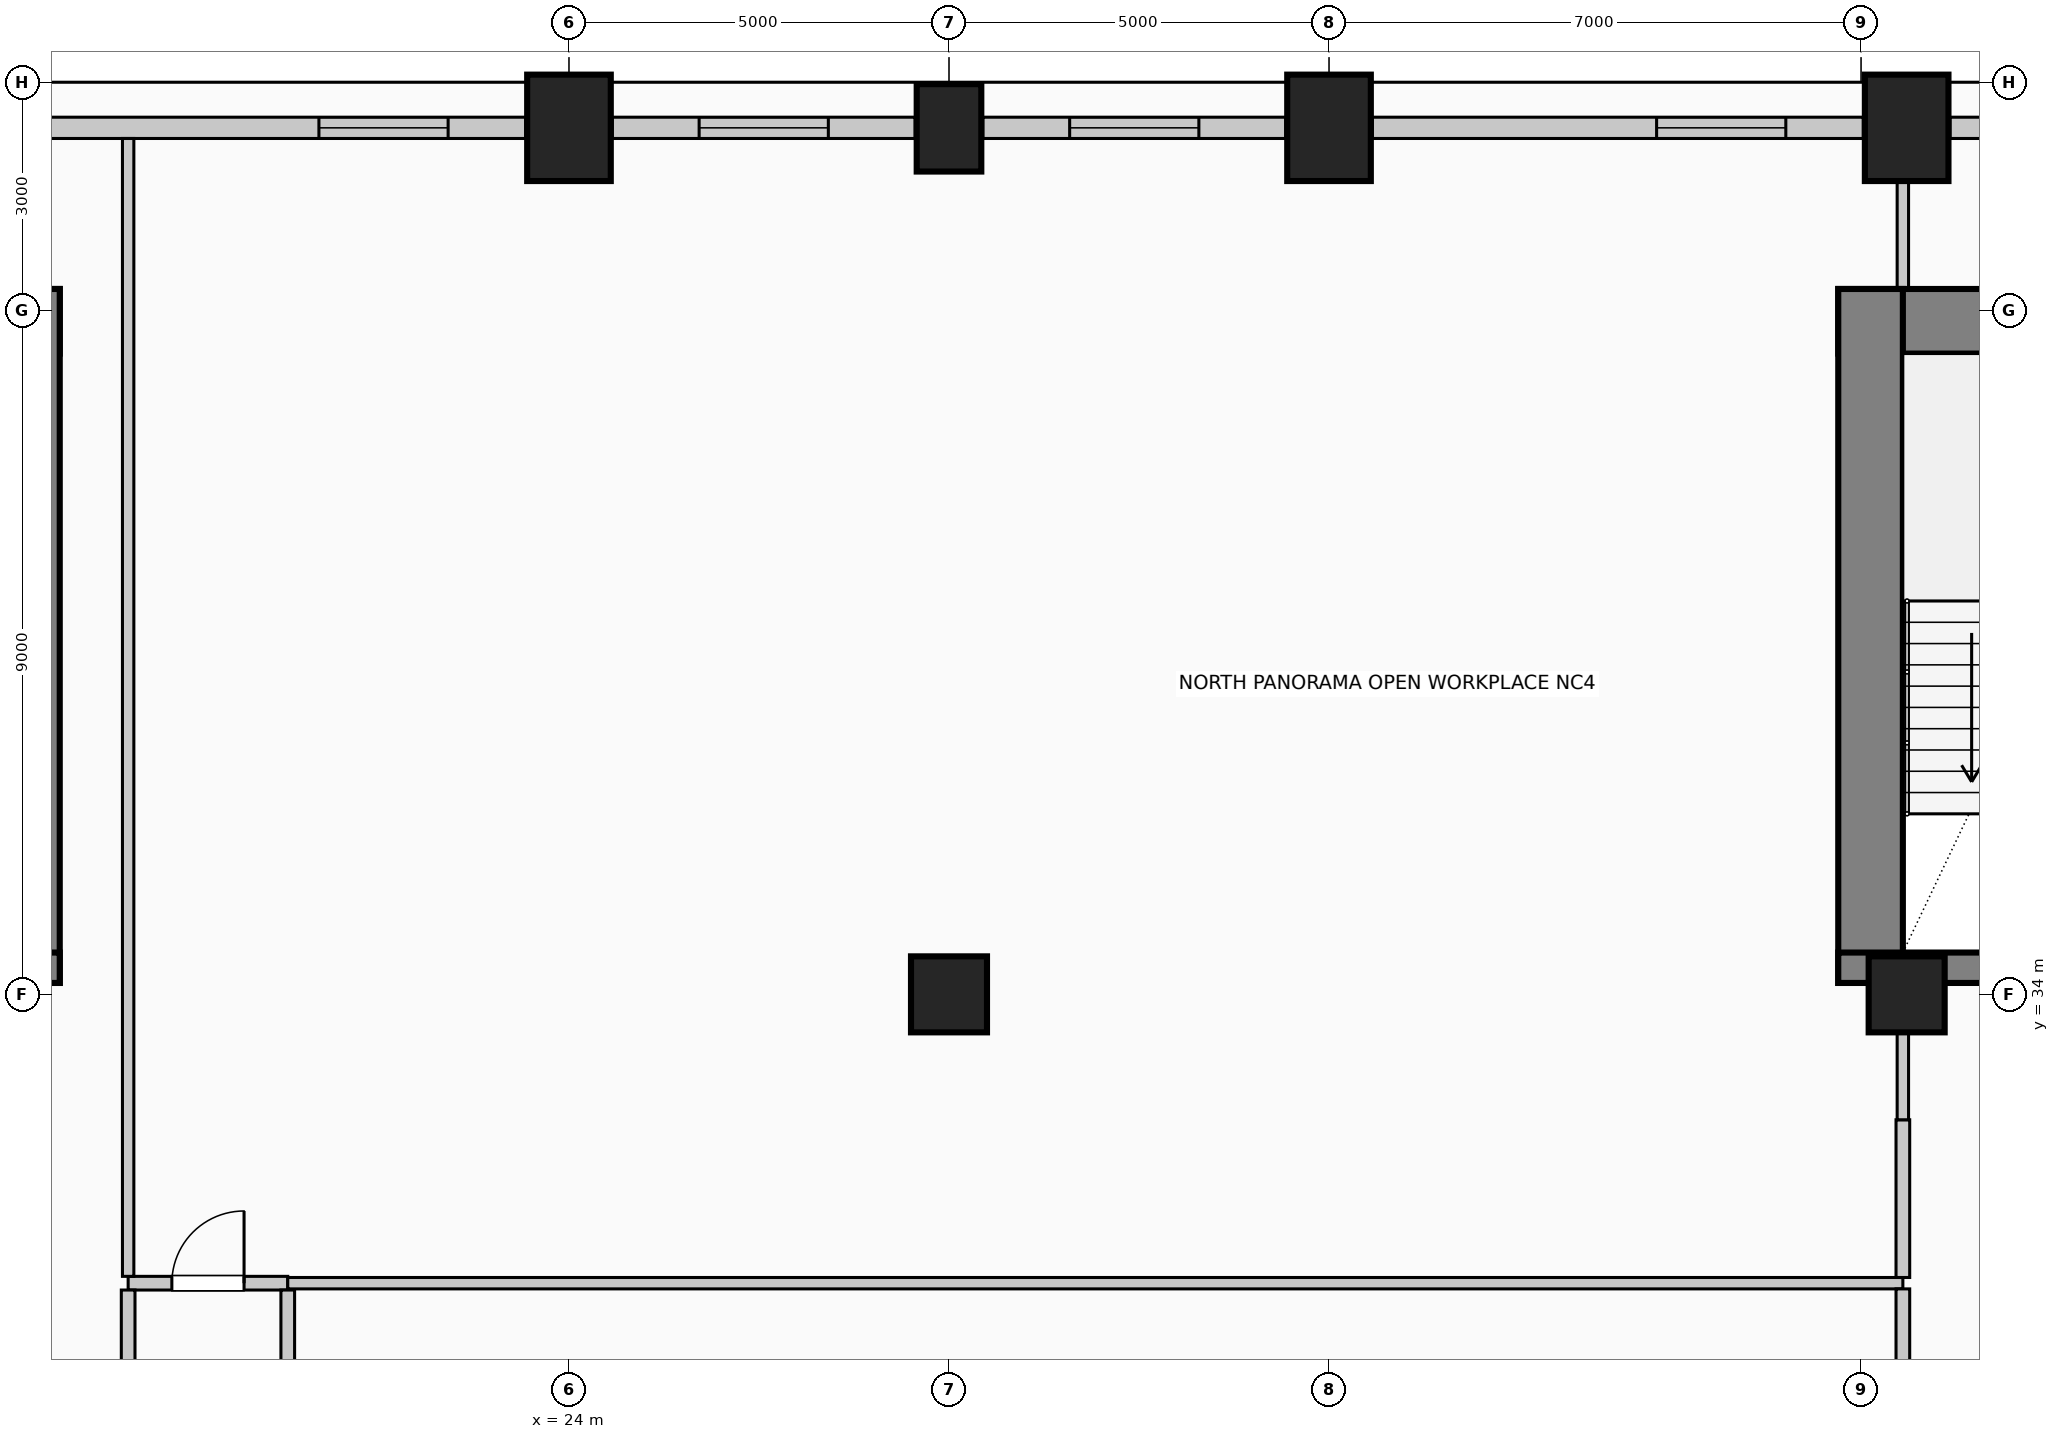
"""IFC4 building model, lengths in metres.
Left out: names, types, materials, properties, quantities, classifications, styles, units other than length and angle.
Written with IfcOpenShell. Run it as: python <this file> out.ifc"""

import sys

from ifc_helpers import new_model, si_unit, direction, frame, frame_2d, origin, origin_2d, place, context, subcontext, project, spatial, rectangle, circle, extrude, element, fill, save


model = new_model("IFC4")
c1 = context("Model", 3, precision=1e-05, world=origin(), true_north=direction((0.0, 1.0)))
c2 = subcontext(c1, "Body", "Model", "MODEL_VIEW")
j1 = project(units=[si_unit("LENGTHUNIT", "METRE"), si_unit("PLANEANGLEUNIT", "RADIAN")], contexts=[c1])
p1 = place(None, origin())
s1 = spatial("IfcSite", under=j1, at=p1, CompositionType="ELEMENT")
p2 = place(p1, origin())
s2 = spatial("IfcBuilding", under=s1, at=p2, CompositionType="ELEMENT")
p3 = place(p2, frame((0.0, 0.0, 96.6)))
s3 = spatial("IfcBuildingStorey", under=s2, at=p3, CompositionType="ELEMENT", Elevation=96.6)
p4 = place(p3, frame((2.7, 42.855, 0.0), z_axis=(0.0, 0.0, 1.0), x_axis=(1.0, 0.0, 0.0)))
e1 = element("IfcWall", 1, at=p4, inside=s3, PredefinedType="SHEAR", context=c2, shape_type="SweptSolid", body=[
    extrude(rectangle(XDim=14.6, YDim=0.85, at=frame_2d((7.3, 0.0))), origin(), (0.0, 0.0, 1.0), 4.0),
])
p5 = place(p3, frame((16.875, 34.15, 0.0), z_axis=(0.0, 0.0, 1.0), x_axis=(0.0, 1.0, 0.0)))
e2 = element("IfcWall", 2, at=p5, inside=s3, PredefinedType="SHEAR", context=c2, shape_type="SweptSolid", body=[
    extrude(rectangle(XDim=9.13, YDim=0.85, at=frame_2d((4.565, 0.0))), origin(), (0.0, 0.0, 1.0), 4.0),
])
p6 = place(p3, frame((12.29, 34.35, 0.0), z_axis=(0.0, 0.0, 1.0), x_axis=(1.0, 0.0, 0.0)))
e3 = element("IfcWall", 3, at=p6, inside=s3, PredefinedType="SHEAR", context=c2, shape_type="SweptSolid", body=[
    extrude(rectangle(XDim=5.01, YDim=0.4, at=frame_2d((2.505, 0.0))), origin(), (0.0, 0.0, 1.0), 4.0),
])
p7 = place(p6, frame((1.4, 0.0, 0.0)))
e4 = element("IfcOpeningElement", 4, at=p7, cuts=e3, PredefinedType="OPENING", context=c2, shape_type="SweptSolid", body=[
    extrude(rectangle(XDim=1.15, YDim=2.2, at=frame_2d((0.575, 1.1))), frame((0.0, 0.21, 0.0), z_axis=(0.0, -1.0, 0.0), x_axis=(1.0, 0.0, 0.0)), (0.0, 0.0, 1.0), 0.42),
])
p8 = place(p3, frame((40.7, 42.855, 0.0), z_axis=(0.0, 0.0, 1.0), x_axis=(1.0, 0.0, 0.0)))
e5 = element("IfcWall", 5, at=p8, inside=s3, PredefinedType="SHEAR", context=c2, shape_type="SweptSolid", body=[
    extrude(rectangle(XDim=14.6, YDim=0.85, at=frame_2d((7.3, 0.0))), origin(), (0.0, 0.0, 1.0), 4.0),
])
p9 = place(p3, frame((41.125, 34.15, 0.0), z_axis=(0.0, 0.0, 1.0), x_axis=(0.0, 1.0, 0.0)))
e6 = element("IfcWall", 6, at=p9, inside=s3, PredefinedType="SHEAR", context=c2, shape_type="SweptSolid", body=[
    extrude(rectangle(XDim=9.13, YDim=0.85, at=frame_2d((4.565, 0.0))), origin(), (0.0, 0.0, 1.0), 4.0),
])
p10 = place(p3, frame((40.7, 34.35, 0.0), z_axis=(0.0, 0.0, 1.0), x_axis=(1.0, 0.0, 0.0)))
e7 = element("IfcWall", 7, at=p10, inside=s3, PredefinedType="SHEAR", context=c2, shape_type="SweptSolid", body=[
    extrude(rectangle(XDim=5.01, YDim=0.4, at=frame_2d((2.505, 0.0))), origin(), (0.0, 0.0, 1.0), 4.0),
])
p11 = place(p10, frame((2.4, 0.0, 0.0)))
e8 = element("IfcOpeningElement", 8, at=p11, cuts=e7, PredefinedType="OPENING", context=c2, shape_type="SweptSolid", body=[
    extrude(rectangle(XDim=1.15, YDim=2.2, at=frame_2d((0.575, 1.1))), frame((0.0, 0.21, 0.0), z_axis=(0.0, -1.0, 0.0), x_axis=(1.0, 0.0, 0.0)), (0.0, 0.0, 1.0), 0.42),
])
p12 = place(p3, frame((24.0, 45.4, 0.0), z_axis=(0.0, 0.0, 1.0), x_axis=(1.0, 0.0, 0.0)))
e9 = element("IfcColumn", 9, at=p12, inside=s3, PredefinedType="COLUMN", context=c2, shape_type="SweptSolid", body=[
    extrude(rectangle(XDim=1.1, YDim=1.4, at=origin_2d()), origin(), (0.0, 0.0, 1.0), 4.0),
])
p13 = place(p3, frame((29.0, 45.4, 0.0), z_axis=(0.0, 0.0, 1.0), x_axis=(1.0, 0.0, 0.0)))
e10 = element("IfcColumn", 10, at=p13, inside=s3, PredefinedType="COLUMN", context=c2, shape_type="SweptSolid", body=[
    extrude(rectangle(XDim=0.85, YDim=1.15, at=origin_2d()), origin(), (0.0, 0.0, 1.0), 4.0),
])
for number, where, z_axis, x_axis in (
    (11, (34.0, 45.4, 0.0), (0.0, 0.0, 1.0), (1.0, 0.0, 0.0)),
    (12, (41.6, 45.4, 0.0), (0.0, 0.0, 1.0), (1.0, 0.0, 0.0)),
):
    element("IfcColumn", number, at=place(p3, frame(where, z_axis=z_axis, x_axis=x_axis)), inside=s3, PredefinedType="COLUMN", context=c2, shape_type="SweptSolid", body=[
        extrude(rectangle(XDim=1.1, YDim=1.4, at=origin_2d()), origin(), (0.0, 0.0, 1.0), 4.0),
    ])
for number, where, z_axis, x_axis in (
    (13, (29.0, 34.0, 0.0), (0.0, 0.0, 1.0), (1.0, 0.0, 0.0)),
    (14, (41.6, 34.0, 0.0), (0.0, 0.0, 1.0), (1.0, 0.0, 0.0)),
):
    element("IfcColumn", number, at=place(p3, frame(where, z_axis=z_axis, x_axis=x_axis)), inside=s3, PredefinedType="COLUMN", context=c2, shape_type="SweptSolid", body=[
        extrude(circle(Radius=0.5, at=origin_2d()), origin(), (0.0, 0.0, 1.0), 4.0),
    ])
p14 = place(p3, frame((16.97, 45.4, 0.0), z_axis=(0.0, 0.0, 1.0), x_axis=(1.0, 0.0, 0.0)))
e15 = element("IfcWall", 15, at=p14, inside=s3, PredefinedType="SOLIDWALL", context=c2, shape_type="SweptSolid", body=[
    extrude(rectangle(XDim=6.46, YDim=0.28, at=frame_2d((3.23, 0.0))), origin(), (0.0, 0.0, 1.0), 2.875),
])
p15 = place(p14, frame((3.74, 0.0, 0.5)))
e16 = element("IfcOpeningElement", 16, at=p15, cuts=e15, PredefinedType="OPENING", context=c2, shape_type="SweptSolid", body=[
    extrude(rectangle(XDim=1.7, YDim=1.95, at=frame_2d((0.85, 0.975))), frame((0.0, 0.15, 0.0), z_axis=(0.0, -1.0, 0.0), x_axis=(1.0, 0.0, 0.0)), (0.0, 0.0, 1.0), 0.3),
])
p16 = place(p3, frame((24.57, 45.4, 0.0), z_axis=(0.0, 0.0, 1.0), x_axis=(1.0, 0.0, 0.0)))
e17 = element("IfcWall", 17, at=p16, inside=s3, PredefinedType="SOLIDWALL", context=c2, shape_type="SweptSolid", body=[
    extrude(rectangle(XDim=3.985, YDim=0.28, at=frame_2d((1.992, 0.0))), origin(), (0.0, 0.0, 1.0), 2.875),
])
p17 = place(p16, frame((1.143, 0.0, 0.5)))
e18 = element("IfcOpeningElement", 18, at=p17, cuts=e17, PredefinedType="OPENING", context=c2, shape_type="SweptSolid", body=[
    extrude(rectangle(XDim=1.7, YDim=1.95, at=frame_2d((0.85, 0.975))), frame((0.0, 0.15, 0.0), z_axis=(0.0, -1.0, 0.0), x_axis=(1.0, 0.0, 0.0)), (0.0, 0.0, 1.0), 0.3),
])
p18 = place(p3, frame((29.445, 45.4, 0.0), z_axis=(0.0, 0.0, 1.0), x_axis=(1.0, 0.0, 0.0)))
e19 = element("IfcWall", 19, at=p18, inside=s3, PredefinedType="SOLIDWALL", context=c2, shape_type="SweptSolid", body=[
    extrude(rectangle(XDim=3.985, YDim=0.28, at=frame_2d((1.992, 0.0))), origin(), (0.0, 0.0, 1.0), 2.875),
])
p19 = place(p18, frame((1.143, 0.0, 0.5)))
e20 = element("IfcOpeningElement", 20, at=p19, cuts=e19, PredefinedType="OPENING", context=c2, shape_type="SweptSolid", body=[
    extrude(rectangle(XDim=1.7, YDim=1.95, at=frame_2d((0.85, 0.975))), frame((0.0, 0.15, 0.0), z_axis=(0.0, -1.0, 0.0), x_axis=(1.0, 0.0, 0.0)), (0.0, 0.0, 1.0), 0.3),
])
p20 = place(p3, frame((34.57, 45.4, 0.0), z_axis=(0.0, 0.0, 1.0), x_axis=(1.0, 0.0, 0.0)))
e21 = element("IfcWall", 21, at=p20, inside=s3, PredefinedType="SOLIDWALL", context=c2, shape_type="SweptSolid", body=[
    extrude(rectangle(XDim=6.46, YDim=0.28, at=frame_2d((3.23, 0.0))), origin(), (0.0, 0.0, 1.0), 2.875),
])
p21 = place(p20, frame((3.74, 0.0, 0.5)))
e22 = element("IfcOpeningElement", 22, at=p21, cuts=e21, PredefinedType="OPENING", context=c2, shape_type="SweptSolid", body=[
    extrude(rectangle(XDim=1.7, YDim=1.95, at=frame_2d((0.85, 0.975))), frame((0.0, 0.15, 0.0), z_axis=(0.0, -1.0, 0.0), x_axis=(1.0, 0.0, 0.0)), (0.0, 0.0, 1.0), 0.3),
])
p22 = place(p3, frame((42.17, 45.4, 0.0), z_axis=(0.0, 0.0, 1.0), x_axis=(1.0, 0.0, 0.0)))
e23 = element("IfcWall", 23, at=p22, inside=s3, PredefinedType="SOLIDWALL", context=c2, shape_type="SweptSolid", body=[
    extrude(rectangle(XDim=1.385, YDim=0.28, at=frame_2d((0.692, 0.0))), origin(), (0.0, 0.0, 1.0), 2.875),
])
p23 = place(p3, frame((18.2, 30.2, 0.0), z_axis=(0.0, 0.0, 1.0), x_axis=(1.0, 0.0, 0.0)))
e24 = element("IfcWall", 24, at=p23, inside=s3, PredefinedType="PARTITIONING", context=c2, shape_type="SweptSolid", body=[
    extrude(rectangle(XDim=2.1, YDim=0.18, at=frame_2d((1.05, 0.0))), origin(), (0.0, 0.0, 1.0), 3.725),
])
p24 = place(p23, frame((0.575, 0.0, 0.0)))
e25 = element("IfcOpeningElement", 25, at=p24, cuts=e24, PredefinedType="OPENING", context=c2, shape_type="SweptSolid", body=[
    extrude(rectangle(XDim=0.95, YDim=2.15, at=frame_2d((0.475, 1.075))), frame((0.0, 0.1, 0.0), z_axis=(0.0, -1.0, 0.0), x_axis=(1.0, 0.0, 0.0)), (0.0, 0.0, 1.0), 0.2),
])
p25 = place(p3, frame((20.3, 30.2, 0.0), z_axis=(0.0, 0.0, 1.0), x_axis=(1.0, 0.0, 0.0)))
e26 = element("IfcWall", 26, at=p25, inside=s3, PredefinedType="PARTITIONING", context=c2, shape_type="SweptSolid", body=[
    extrude(rectangle(XDim=21.25, YDim=0.15, at=frame_2d((10.625, 0.0))), origin(), (0.0, 0.0, 1.0), 3.725),
])
p26 = place(p3, frame((18.2, 15.74, 0.0), z_axis=(0.0, 0.0, 1.0), x_axis=(0.0, 1.0, 0.0)))
e27 = element("IfcWall", 27, at=p26, inside=s3, PredefinedType="PARTITIONING", context=c2, shape_type="SweptSolid", body=[
    extrude(rectangle(XDim=14.37, YDim=0.18, at=frame_2d((7.185, 0.0))), origin(), (0.0, 0.0, 1.0), 3.725),
])
p27 = place(p3, frame((18.2, 30.29, 0.0), z_axis=(0.0, 0.0, 1.0), x_axis=(0.0, 1.0, 0.0)))
e28 = element("IfcWall", 28, at=p27, inside=s3, PredefinedType="PARTITIONING", context=c2, shape_type="SweptSolid", body=[
    extrude(rectangle(XDim=14.97, YDim=0.15, at=frame_2d((7.485, 0.0))), origin(), (0.0, 0.0, 1.0), 3.725),
])
p28 = place(p3, frame((20.3, 15.74, 0.0), z_axis=(0.0, 0.0, 1.0), x_axis=(0.0, 1.0, 0.0)))
e29 = element("IfcWall", 29, at=p28, inside=s3, PredefinedType="PARTITIONING", context=c2, shape_type="SweptSolid", body=[
    extrude(rectangle(XDim=14.37, YDim=0.18, at=frame_2d((7.185, 0.0))), origin(), (0.0, 0.0, 1.0), 3.725),
])
p29 = place(p3, frame((41.55, 18.5, 0.0), z_axis=(0.0, 0.0, 1.0), x_axis=(0.0, 1.0, 0.0)))
e30 = element("IfcWall", 30, at=p29, inside=s3, PredefinedType="PARTITIONING", context=c2, shape_type="SweptSolid", body=[
    extrude(rectangle(XDim=11.625, YDim=0.18, at=frame_2d((5.812, 0.0))), origin(), (0.0, 0.0, 1.0), 3.07),
])
p30 = place(p3, frame((41.55, 30.275, 0.0), z_axis=(0.0, 0.0, 1.0), x_axis=(0.0, 1.0, 0.0)))
e31 = element("IfcWall", 31, at=p30, inside=s3, PredefinedType="PARTITIONING", context=c2, shape_type="SweptSolid", body=[
    extrude(rectangle(XDim=2.075, YDim=0.18, at=frame_2d((1.038, 0.0))), origin(), (0.0, 0.0, 1.0), 3.07),
])
p31 = place(p3, frame((41.55, 32.35, 0.0), z_axis=(0.0, 0.0, 1.0), x_axis=(0.0, 1.0, 0.0)))
e32 = element("IfcWall", 32, at=p31, inside=s3, PredefinedType="PARTITIONING", context=c2, shape_type="SweptSolid", body=[
    extrude(rectangle(XDim=1.15, YDim=0.15, at=frame_2d((0.575, 0.0))), origin(), (0.0, 0.0, 1.0), 3.07),
])
p32 = place(p3, frame((41.55, 43.28, 0.0), z_axis=(0.0, 0.0, 1.0), x_axis=(0.0, 1.0, 0.0)))
e33 = element("IfcWall", 33, at=p32, inside=s3, PredefinedType="PARTITIONING", context=c2, shape_type="SweptSolid", body=[
    extrude(rectangle(XDim=1.42, YDim=0.15, at=frame_2d((0.71, 0.0))), origin(), (0.0, 0.0, 1.0), 3.725),
])
p33 = place(p15, origin())
e34 = element("IfcWindow", 34, at=p33, inside=s3, PartitioningType="SINGLE_PANEL", PredefinedType="WINDOW", context=c2, shape_type="SweptSolid", body=[
    extrude(rectangle(XDim=1.7, YDim=1.95, at=frame_2d((0.85, 0.975))), frame((0.0, 0.03, 0.0), z_axis=(0.0, -1.0, 0.0), x_axis=(1.0, 0.0, 0.0)), (0.0, 0.0, 1.0), 0.06),
])
fill(e16, e34)
p34 = place(p17, origin())
e35 = element("IfcWindow", 35, at=p34, inside=s3, PartitioningType="SINGLE_PANEL", PredefinedType="WINDOW", context=c2, shape_type="SweptSolid", body=[
    extrude(rectangle(XDim=1.7, YDim=1.95, at=frame_2d((0.85, 0.975))), frame((0.0, 0.03, 0.0), z_axis=(0.0, -1.0, 0.0), x_axis=(1.0, 0.0, 0.0)), (0.0, 0.0, 1.0), 0.06),
])
fill(e18, e35)
p35 = place(p19, origin())
e36 = element("IfcWindow", 36, at=p35, inside=s3, PartitioningType="SINGLE_PANEL", PredefinedType="WINDOW", context=c2, shape_type="SweptSolid", body=[
    extrude(rectangle(XDim=1.7, YDim=1.95, at=frame_2d((0.85, 0.975))), frame((0.0, 0.03, 0.0), z_axis=(0.0, -1.0, 0.0), x_axis=(1.0, 0.0, 0.0)), (0.0, 0.0, 1.0), 0.06),
])
fill(e20, e36)
p36 = place(p21, origin())
e37 = element("IfcWindow", 37, at=p36, inside=s3, PartitioningType="SINGLE_PANEL", PredefinedType="WINDOW", context=c2, shape_type="SweptSolid", body=[
    extrude(rectangle(XDim=1.7, YDim=1.95, at=frame_2d((0.85, 0.975))), frame((0.0, 0.03, 0.0), z_axis=(0.0, -1.0, 0.0), x_axis=(1.0, 0.0, 0.0)), (0.0, 0.0, 1.0), 0.06),
])
fill(e22, e37)
p37 = place(p24, origin())
e38 = element("IfcDoor", 38, at=p37, inside=s3, OperationType="SINGLE_SWING_RIGHT", PredefinedType="DOOR", context=c2, shape_type="SweptSolid", body=[
    extrude(rectangle(XDim=0.95, YDim=2.15, at=frame_2d((0.475, 1.075))), frame((0.0, 0.025, 0.0), z_axis=(0.0, -1.0, 0.0), x_axis=(1.0, 0.0, 0.0)), (0.0, 0.0, 1.0), 0.05),
])
fill(e25, e38)
save(model, sys.argv[1])
